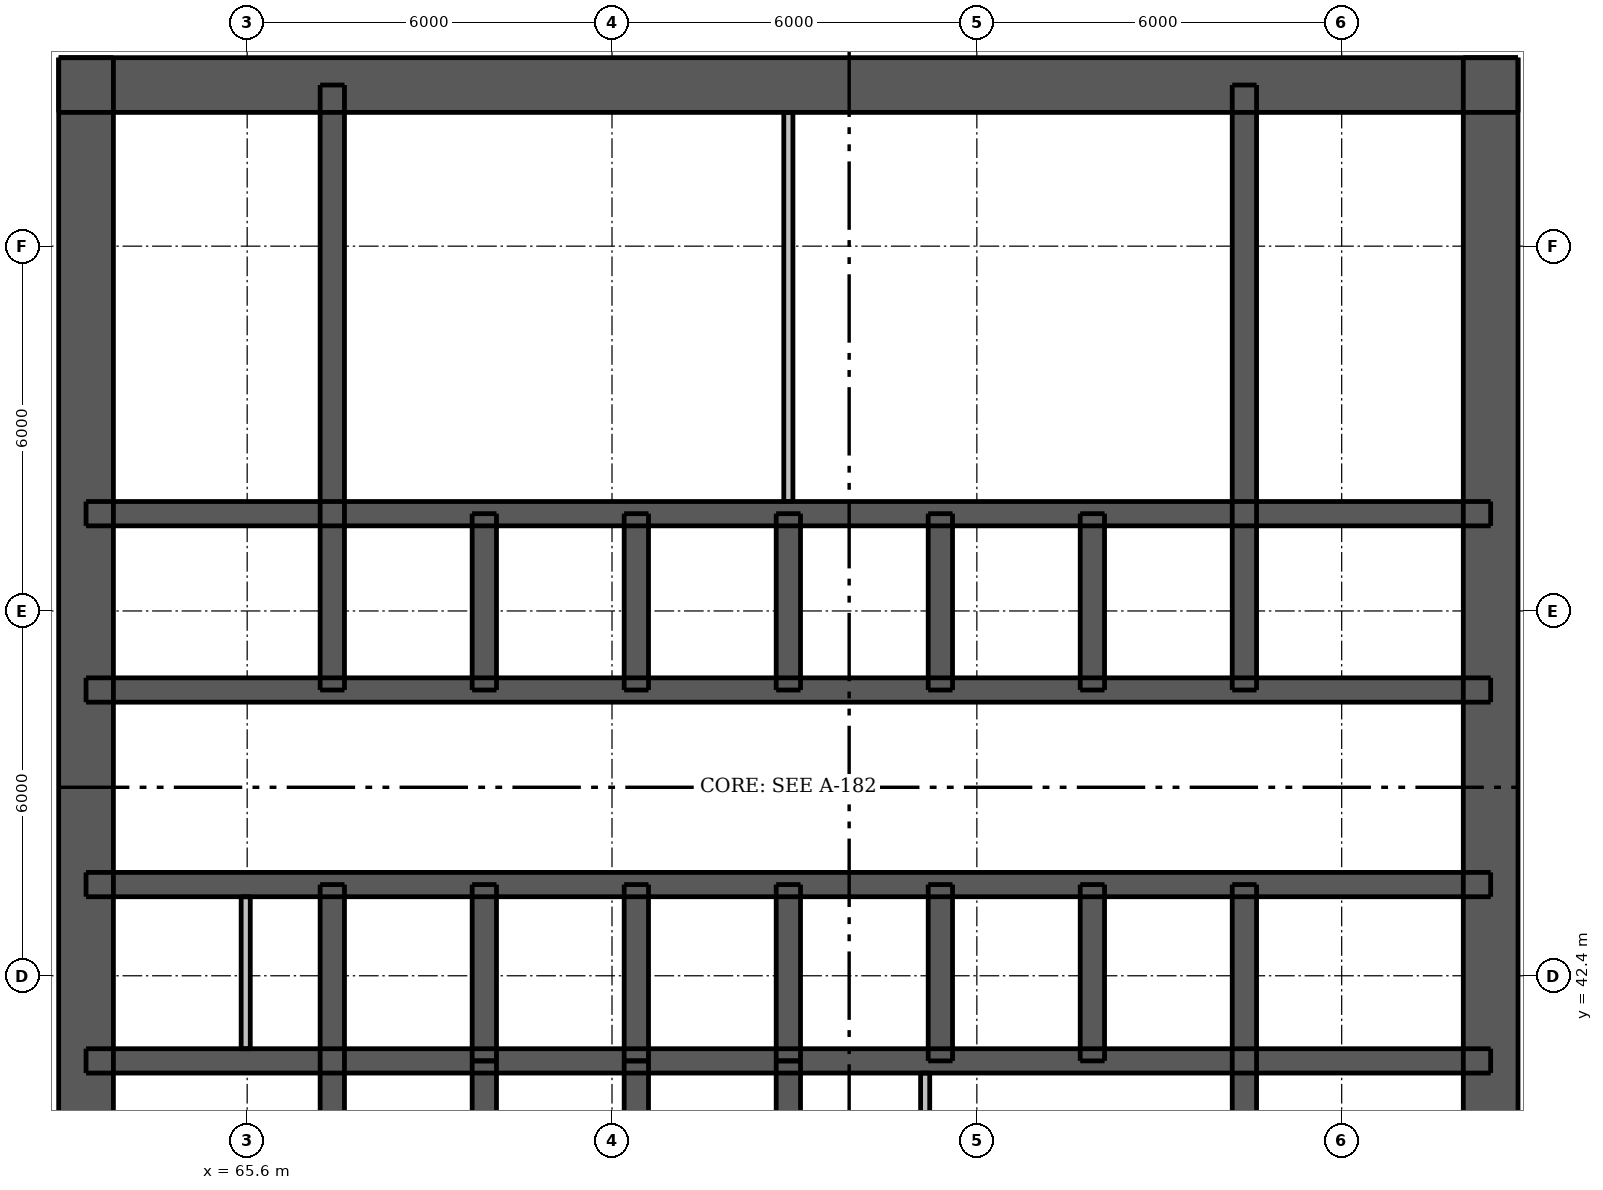
"""IFC4 building model, lengths in metres.
Left out: names, types, materials, properties, quantities, classifications, styles, units other than length and angle.
Written with IfcOpenShell. Run it as: python <this file> out.ifc"""

import sys

from ifc_helpers import new_model, si_unit, direction, frame, frame_2d, origin, place, context, subcontext, project, spatial, rectangle, extrude, element, fill, save


model = new_model("IFC4")
c1 = context("Model", 3, precision=1e-05, world=origin(), true_north=direction((0.0, 1.0)))
c2 = subcontext(c1, "Body", "Model", "MODEL_VIEW")
j1 = project(units=[si_unit("LENGTHUNIT", "METRE"), si_unit("PLANEANGLEUNIT", "RADIAN")], contexts=[c1])
p1 = place(None, origin())
s1 = spatial("IfcSite", under=j1, at=p1, CompositionType="ELEMENT")
p2 = place(p1, origin())
s2 = spatial("IfcBuilding", under=s1, at=p2, CompositionType="ELEMENT")
p3 = place(p2, frame((0.0, 0.0, 10.0)))
s3 = spatial("IfcBuildingStorey", under=s2, at=p3, CompositionType="ELEMENT", Elevation=10.0)
p4 = place(p3, frame((62.5, 57.05, 0.0), z_axis=(0.0, 0.0, 1.0), x_axis=(1.0, 0.0, 0.0)))
e1 = element("IfcWall", 1, at=p4, inside=s3, PredefinedType="SHEAR", context=c2, shape_type="SweptSolid", body=[
    extrude(rectangle(XDim=24.0, YDim=0.9, at=frame_2d((12.0, 0.0))), origin(), (0.0, 0.0, 1.0), 4.2),
])
p5 = place(p4, frame((20.85, 0.0, 0.0)))
e2 = element("IfcOpeningElement", 2, at=p5, cuts=e1, PredefinedType="OPENING", context=c2, shape_type="SweptSolid", body=[
    extrude(rectangle(XDim=1.1, YDim=2.1, at=frame_2d((0.55, 1.05))), frame((0.0, 0.46, 0.0), z_axis=(0.0, -1.0, 0.0), x_axis=(1.0, 0.0, 0.0)), (0.0, 0.0, 1.0), 0.92),
])
p6 = place(p4, frame((2.05, 0.0, 0.0)))
e3 = element("IfcOpeningElement", 3, at=p6, cuts=e1, PredefinedType="OPENING", context=c2, shape_type="SweptSolid", body=[
    extrude(rectangle(XDim=1.1, YDim=2.1, at=frame_2d((0.55, 1.05))), frame((0.0, 0.46, 0.0), z_axis=(0.0, -1.0, 0.0), x_axis=(1.0, 0.0, 0.0)), (0.0, 0.0, 1.0), 0.92),
])
p7 = place(p4, frame((7.9, 0.0, 0.0)))
e4 = element("IfcOpeningElement", 4, at=p7, cuts=e1, PredefinedType="OPENING", context=c2, shape_type="SweptSolid", body=[
    extrude(rectangle(XDim=0.9, YDim=2.1, at=frame_2d((0.45, 1.05))), frame((0.0, 0.46, 0.0), z_axis=(0.0, -1.0, 0.0), x_axis=(1.0, 0.0, 0.0)), (0.0, 0.0, 1.0), 0.92),
])
p8 = place(p4, frame((15.2, 0.0, 0.0)))
e5 = element("IfcOpeningElement", 5, at=p8, cuts=e1, PredefinedType="OPENING", context=c2, shape_type="SweptSolid", body=[
    extrude(rectangle(XDim=0.9, YDim=2.1, at=frame_2d((0.45, 1.05))), frame((0.0, 0.46, 0.0), z_axis=(0.0, -1.0, 0.0), x_axis=(1.0, 0.0, 0.0)), (0.0, 0.0, 1.0), 0.92),
])
p9 = place(p3, frame((62.95, 33.5, 0.0), z_axis=(0.0, 0.0, 1.0), x_axis=(0.0, 1.0, 0.0)))
e6 = element("IfcWall", 6, at=p9, inside=s3, PredefinedType="SHEAR", context=c2, shape_type="SweptSolid", body=[
    extrude(rectangle(XDim=24.0, YDim=0.9, at=frame_2d((12.0, 0.0))), origin(), (0.0, 0.0, 1.0), 4.2),
])
p10 = place(p9, frame((11.2, 0.0, 0.0)))
e7 = element("IfcOpeningElement", 7, at=p10, cuts=e6, PredefinedType="OPENING", context=c2, shape_type="SweptSolid", body=[
    extrude(rectangle(XDim=1.6, YDim=2.1, at=frame_2d((0.8, 1.05))), frame((0.0, 0.46, 0.0), z_axis=(0.0, -1.0, 0.0), x_axis=(1.0, 0.0, 0.0)), (0.0, 0.0, 1.0), 0.92),
])
p11 = place(p3, frame((86.05, 33.5, 0.0), z_axis=(0.0, 0.0, 1.0), x_axis=(0.0, 1.0, 0.0)))
e8 = element("IfcWall", 8, at=p11, inside=s3, PredefinedType="SHEAR", context=c2, shape_type="SweptSolid", body=[
    extrude(rectangle(XDim=24.0, YDim=0.9, at=frame_2d((12.0, 0.0))), origin(), (0.0, 0.0, 1.0), 4.2),
])
p12 = place(p11, frame((11.2, 0.0, 0.0)))
e9 = element("IfcOpeningElement", 9, at=p12, cuts=e8, PredefinedType="OPENING", context=c2, shape_type="SweptSolid", body=[
    extrude(rectangle(XDim=1.6, YDim=2.1, at=frame_2d((0.8, 1.05))), frame((0.0, 0.46, 0.0), z_axis=(0.0, -1.0, 0.0), x_axis=(1.0, 0.0, 0.0)), (0.0, 0.0, 1.0), 0.92),
])
p13 = place(p3, frame((62.95, 41.0, 0.0), z_axis=(0.0, 0.0, 1.0), x_axis=(1.0, 0.0, 0.0)))
e10 = element("IfcWall", 10, at=p13, inside=s3, PredefinedType="SHEAR", context=c2, shape_type="SweptSolid", body=[
    extrude(rectangle(XDim=23.1, YDim=0.4, at=frame_2d((11.55, 0.0))), origin(), (0.0, 0.0, 1.0), 4.2),
])
p14 = place(p3, frame((62.95, 43.9, 0.0), z_axis=(0.0, 0.0, 1.0), x_axis=(1.0, 0.0, 0.0)))
e11 = element("IfcWall", 11, at=p14, inside=s3, PredefinedType="SHEAR", context=c2, shape_type="SweptSolid", body=[
    extrude(rectangle(XDim=23.1, YDim=0.4, at=frame_2d((11.55, 0.0))), origin(), (0.0, 0.0, 1.0), 4.2),
])
p15 = place(p14, frame((1.088, 0.0, 0.0)))
e12 = element("IfcOpeningElement", 12, at=p15, cuts=e11, PredefinedType="OPENING", context=c2, shape_type="SweptSolid", body=[
    extrude(rectangle(XDim=0.9, YDim=2.1, at=frame_2d((0.45, 1.05))), frame((0.0, 0.21, 0.0), z_axis=(0.0, -1.0, 0.0), x_axis=(1.0, 0.0, 0.0)), (0.0, 0.0, 1.0), 0.42),
])
p16 = place(p14, frame((2.838, 0.0, 0.0)))
e13 = element("IfcOpeningElement", 13, at=p16, cuts=e11, PredefinedType="OPENING", context=c2, shape_type="SweptSolid", body=[
    extrude(rectangle(XDim=0.8, YDim=2.1, at=frame_2d((0.4, 1.05))), frame((0.0, 0.21, 0.0), z_axis=(0.0, -1.0, 0.0), x_axis=(1.0, 0.0, 0.0)), (0.0, 0.0, 1.0), 0.42),
])
p17 = place(p14, frame((20.5, 0.0, 0.0)))
e14 = element("IfcOpeningElement", 14, at=p17, cuts=e11, PredefinedType="OPENING", context=c2, shape_type="SweptSolid", body=[
    extrude(rectangle(XDim=0.9, YDim=2.1, at=frame_2d((0.45, 1.05))), frame((0.0, 0.21, 0.0), z_axis=(0.0, -1.0, 0.0), x_axis=(1.0, 0.0, 0.0)), (0.0, 0.0, 1.0), 0.42),
])
p18 = place(p14, frame((4.75, 0.0, 0.0)))
e15 = element("IfcOpeningElement", 15, at=p18, cuts=e11, PredefinedType="OPENING", context=c2, shape_type="SweptSolid", body=[
    extrude(rectangle(XDim=1.1, YDim=2.1, at=frame_2d((0.55, 1.05))), frame((0.0, 0.21, 0.0), z_axis=(0.0, -1.0, 0.0), x_axis=(1.0, 0.0, 0.0)), (0.0, 0.0, 1.0), 0.42),
])
p19 = place(p14, frame((7.25, 0.0, 0.0)))
e16 = element("IfcOpeningElement", 16, at=p19, cuts=e11, PredefinedType="OPENING", context=c2, shape_type="SweptSolid", body=[
    extrude(rectangle(XDim=1.1, YDim=2.1, at=frame_2d((0.55, 1.05))), frame((0.0, 0.21, 0.0), z_axis=(0.0, -1.0, 0.0), x_axis=(1.0, 0.0, 0.0)), (0.0, 0.0, 1.0), 0.42),
])
p20 = place(p14, frame((9.75, 0.0, 0.0)))
e17 = element("IfcOpeningElement", 17, at=p20, cuts=e11, PredefinedType="OPENING", context=c2, shape_type="SweptSolid", body=[
    extrude(rectangle(XDim=1.1, YDim=2.1, at=frame_2d((0.55, 1.05))), frame((0.0, 0.21, 0.0), z_axis=(0.0, -1.0, 0.0), x_axis=(1.0, 0.0, 0.0)), (0.0, 0.0, 1.0), 0.42),
])
p21 = place(p14, frame((12.25, 0.0, 0.0)))
e18 = element("IfcOpeningElement", 18, at=p21, cuts=e11, PredefinedType="OPENING", context=c2, shape_type="SweptSolid", body=[
    extrude(rectangle(XDim=1.1, YDim=2.1, at=frame_2d((0.55, 1.05))), frame((0.0, 0.21, 0.0), z_axis=(0.0, -1.0, 0.0), x_axis=(1.0, 0.0, 0.0)), (0.0, 0.0, 1.0), 0.42),
])
p22 = place(p14, frame((14.75, 0.0, 0.0)))
e19 = element("IfcOpeningElement", 19, at=p22, cuts=e11, PredefinedType="OPENING", context=c2, shape_type="SweptSolid", body=[
    extrude(rectangle(XDim=1.1, YDim=2.1, at=frame_2d((0.55, 1.05))), frame((0.0, 0.21, 0.0), z_axis=(0.0, -1.0, 0.0), x_axis=(1.0, 0.0, 0.0)), (0.0, 0.0, 1.0), 0.42),
])
p23 = place(p14, frame((17.25, 0.0, 0.0)))
e20 = element("IfcOpeningElement", 20, at=p23, cuts=e11, PredefinedType="OPENING", context=c2, shape_type="SweptSolid", body=[
    extrude(rectangle(XDim=1.1, YDim=2.1, at=frame_2d((0.55, 1.05))), frame((0.0, 0.21, 0.0), z_axis=(0.0, -1.0, 0.0), x_axis=(1.0, 0.0, 0.0)), (0.0, 0.0, 1.0), 0.42),
])
p24 = place(p3, frame((62.95, 47.1, 0.0), z_axis=(0.0, 0.0, 1.0), x_axis=(1.0, 0.0, 0.0)))
e21 = element("IfcWall", 21, at=p24, inside=s3, PredefinedType="SHEAR", context=c2, shape_type="SweptSolid", body=[
    extrude(rectangle(XDim=23.1, YDim=0.4, at=frame_2d((11.55, 0.0))), origin(), (0.0, 0.0, 1.0), 4.2),
])
p25 = place(p24, frame((1.7, 0.0, 0.0)))
e22 = element("IfcOpeningElement", 22, at=p25, cuts=e21, PredefinedType="OPENING", context=c2, shape_type="SweptSolid", body=[
    extrude(rectangle(XDim=0.9, YDim=2.1, at=frame_2d((0.45, 1.05))), frame((0.0, 0.21, 0.0), z_axis=(0.0, -1.0, 0.0), x_axis=(1.0, 0.0, 0.0)), (0.0, 0.0, 1.0), 0.42),
])
p26 = place(p24, frame((20.5, 0.0, 0.0)))
e23 = element("IfcOpeningElement", 23, at=p26, cuts=e21, PredefinedType="OPENING", context=c2, shape_type="SweptSolid", body=[
    extrude(rectangle(XDim=0.9, YDim=2.1, at=frame_2d((0.45, 1.05))), frame((0.0, 0.21, 0.0), z_axis=(0.0, -1.0, 0.0), x_axis=(1.0, 0.0, 0.0)), (0.0, 0.0, 1.0), 0.42),
])
p27 = place(p3, frame((62.95, 50.0, 0.0), z_axis=(0.0, 0.0, 1.0), x_axis=(1.0, 0.0, 0.0)))
e24 = element("IfcWall", 24, at=p27, inside=s3, PredefinedType="SHEAR", context=c2, shape_type="SweptSolid", body=[
    extrude(rectangle(XDim=23.1, YDim=0.4, at=frame_2d((11.55, 0.0))), origin(), (0.0, 0.0, 1.0), 4.2),
])
p28 = place(p3, frame((67.0, 33.95, 0.0), z_axis=(0.0, 0.0, 1.0), x_axis=(0.0, 1.0, 0.0)))
e25 = element("IfcWall", 25, at=p28, inside=s3, PredefinedType="SHEAR", context=c2, shape_type="SweptSolid", body=[
    extrude(rectangle(XDim=9.95, YDim=0.4, at=frame_2d((4.975, 0.0))), origin(), (0.0, 0.0, 1.0), 4.2),
])
p29 = place(p28, frame((0.65, 0.0, 0.0)))
e26 = element("IfcOpeningElement", 26, at=p29, cuts=e25, PredefinedType="OPENING", context=c2, shape_type="SweptSolid", body=[
    extrude(rectangle(XDim=1.1, YDim=2.1, at=frame_2d((0.55, 1.05))), frame((0.0, 0.21, 0.0), z_axis=(0.0, -1.0, 0.0), x_axis=(1.0, 0.0, 0.0)), (0.0, 0.0, 1.0), 0.42),
])
for number, where, z_axis, x_axis in (
    (27, (67.0, 47.1, 0.0), (0.0, 0.0, 1.0), (0.0, 1.0, 0.0)),
    (28, (82.0, 33.95, 0.0), (0.0, 0.0, 1.0), (0.0, 1.0, 0.0)),
    (29, (82.0, 47.1, 0.0), (0.0, 0.0, 1.0), (0.0, 1.0, 0.0)),
):
    element("IfcWall", number, at=place(p3, frame(where, z_axis=z_axis, x_axis=x_axis)), inside=s3, PredefinedType="SHEAR", context=c2, shape_type="SweptSolid", body=[
        extrude(rectangle(XDim=9.95, YDim=0.4, at=frame_2d((4.975, 0.0))), origin(), (0.0, 0.0, 1.0), 4.2),
    ])
for number, where, z_axis, x_axis in (
    (30, (69.5, 41.0, 0.0), (0.0, 0.0, 1.0), (0.0, 1.0, 0.0)),
    (31, (69.5, 47.1, 0.0), (0.0, 0.0, 1.0), (0.0, 1.0, 0.0)),
    (32, (72.0, 41.0, 0.0), (0.0, 0.0, 1.0), (0.0, 1.0, 0.0)),
    (33, (72.0, 47.1, 0.0), (0.0, 0.0, 1.0), (0.0, 1.0, 0.0)),
    (34, (74.5, 41.0, 0.0), (0.0, 0.0, 1.0), (0.0, 1.0, 0.0)),
    (35, (74.5, 47.1, 0.0), (0.0, 0.0, 1.0), (0.0, 1.0, 0.0)),
    (36, (77.0, 41.0, 0.0), (0.0, 0.0, 1.0), (0.0, 1.0, 0.0)),
    (37, (77.0, 47.1, 0.0), (0.0, 0.0, 1.0), (0.0, 1.0, 0.0)),
    (38, (79.5, 41.0, 0.0), (0.0, 0.0, 1.0), (0.0, 1.0, 0.0)),
    (39, (79.5, 47.1, 0.0), (0.0, 0.0, 1.0), (0.0, 1.0, 0.0)),
    (40, (69.5, 38.1, 0.0), (0.0, 0.0, 1.0), (0.0, 1.0, 0.0)),
    (41, (72.0, 38.1, 0.0), (0.0, 0.0, 1.0), (0.0, 1.0, 0.0)),
    (42, (74.5, 38.1, 0.0), (0.0, 0.0, 1.0), (0.0, 1.0, 0.0)),
):
    element("IfcWall", number, at=place(p3, frame(where, z_axis=z_axis, x_axis=x_axis)), inside=s3, PredefinedType="SHEAR", context=c2, shape_type="SweptSolid", body=[
        extrude(rectangle(XDim=2.9, YDim=0.4, at=frame_2d((1.45, 0.0))), origin(), (0.0, 0.0, 1.0), 4.2),
    ])
p30 = place(p3, frame((76.75, 34.4, 0.0), z_axis=(0.0, 0.0, 1.0), x_axis=(0.0, 1.0, 0.0)))
e43 = element("IfcWall", 43, at=p30, inside=s3, PredefinedType="PLUMBINGWALL", context=c2, shape_type="SweptSolid", body=[
    extrude(rectangle(XDim=6.4, YDim=0.15, at=frame_2d((3.2, 0.0))), origin(), (0.0, 0.0, 1.0), 4.2),
])
p31 = place(p3, frame((65.576, 41.2, 0.0), z_axis=(0.0, 0.0, 1.0), x_axis=(0.0, 1.0, 0.0)))
e44 = element("IfcWall", 44, at=p31, inside=s3, PredefinedType="PLUMBINGWALL", context=c2, shape_type="SweptSolid", body=[
    extrude(rectangle(XDim=2.5, YDim=0.15, at=frame_2d((1.25, 0.0))), origin(), (0.0, 0.0, 1.0), 4.2),
])
p32 = place(p3, frame((74.5, 50.2, 0.0), z_axis=(0.0, 0.0, 1.0), x_axis=(0.0, 1.0, 0.0)))
e45 = element("IfcWall", 45, at=p32, inside=s3, PredefinedType="PLUMBINGWALL", context=c2, shape_type="SweptSolid", body=[
    extrude(rectangle(XDim=6.4, YDim=0.15, at=frame_2d((3.2, 0.0))), origin(), (0.0, 0.0, 1.0), 4.2),
])
p33 = place(p5, origin())
e46 = element("IfcDoor", 46, at=p33, inside=s3, OperationType="SINGLE_SWING_RIGHT", PredefinedType="DOOR", context=c2, shape_type="SweptSolid", body=[
    extrude(rectangle(XDim=1.1, YDim=2.1, at=frame_2d((0.55, 1.05))), frame((0.0, -0.388, 0.0), z_axis=(0.0, -1.0, 0.0), x_axis=(1.0, 0.0, 0.0)), (0.0, 0.0, 1.0), 0.05),
])
fill(e2, e46)
p34 = place(p6, origin())
e47 = element("IfcDoor", 47, at=p34, inside=s3, OperationType="SINGLE_SWING_LEFT", PredefinedType="DOOR", context=c2, shape_type="SweptSolid", body=[
    extrude(rectangle(XDim=1.1, YDim=2.1, at=frame_2d((0.55, 1.05))), frame((0.0, -0.388, 0.0), z_axis=(0.0, -1.0, 0.0), x_axis=(1.0, 0.0, 0.0)), (0.0, 0.0, 1.0), 0.05),
])
fill(e3, e47)
p35 = place(p10, origin())
e48 = element("IfcDoor", 48, at=p35, inside=s3, OperationType="DOUBLE_DOOR_SINGLE_SWING", PredefinedType="DOOR", context=c2, shape_type="SweptSolid", body=[
    extrude(rectangle(XDim=1.6, YDim=2.1, at=frame_2d((0.8, 1.05))), frame((0.0, -0.388, 0.0), z_axis=(0.0, -1.0, 0.0), x_axis=(1.0, 0.0, 0.0)), (0.0, 0.0, 1.0), 0.05),
])
fill(e7, e48)
p36 = place(p12, origin())
e49 = element("IfcDoor", 49, at=p36, inside=s3, OperationType="DOUBLE_DOOR_SINGLE_SWING", PredefinedType="DOOR", context=c2, shape_type="SweptSolid", body=[
    extrude(rectangle(XDim=1.6, YDim=2.1, at=frame_2d((0.8, 1.05))), frame((0.0, 0.438, 0.0), z_axis=(0.0, -1.0, 0.0), x_axis=(1.0, 0.0, 0.0)), (0.0, 0.0, 1.0), 0.05),
])
fill(e9, e49)
p37 = place(p15, origin())
e50 = element("IfcDoor", 50, at=p37, inside=s3, OperationType="SINGLE_SWING_LEFT", PredefinedType="DOOR", context=c2, shape_type="SweptSolid", body=[
    extrude(rectangle(XDim=0.9, YDim=2.1, at=frame_2d((0.45, 1.05))), frame((0.0, -0.138, 0.0), z_axis=(0.0, -1.0, 0.0), x_axis=(1.0, 0.0, 0.0)), (0.0, 0.0, 1.0), 0.05),
])
fill(e12, e50)
p38 = place(p16, origin())
e51 = element("IfcDoor", 51, at=p38, inside=s3, OperationType="SINGLE_SWING_RIGHT", PredefinedType="DOOR", context=c2, shape_type="SweptSolid", body=[
    extrude(rectangle(XDim=0.8, YDim=2.1, at=frame_2d((0.4, 1.05))), frame((0.0, -0.138, 0.0), z_axis=(0.0, -1.0, 0.0), x_axis=(1.0, 0.0, 0.0)), (0.0, 0.0, 1.0), 0.05),
])
fill(e13, e51)
p39 = place(p17, origin())
e52 = element("IfcDoor", 52, at=p39, inside=s3, OperationType="SINGLE_SWING_LEFT", PredefinedType="DOOR", context=c2, shape_type="SweptSolid", body=[
    extrude(rectangle(XDim=0.9, YDim=2.1, at=frame_2d((0.45, 1.05))), frame((0.0, -0.138, 0.0), z_axis=(0.0, -1.0, 0.0), x_axis=(1.0, 0.0, 0.0)), (0.0, 0.0, 1.0), 0.05),
])
fill(e14, e52)
p40 = place(p25, origin())
e53 = element("IfcDoor", 53, at=p40, inside=s3, OperationType="SINGLE_SWING_LEFT", PredefinedType="DOOR", context=c2, shape_type="SweptSolid", body=[
    extrude(rectangle(XDim=0.9, YDim=2.1, at=frame_2d((0.45, 1.05))), frame((0.0, 0.188, 0.0), z_axis=(0.0, -1.0, 0.0), x_axis=(1.0, 0.0, 0.0)), (0.0, 0.0, 1.0), 0.05),
])
fill(e22, e53)
p41 = place(p26, origin())
e54 = element("IfcDoor", 54, at=p41, inside=s3, OperationType="SINGLE_SWING_LEFT", PredefinedType="DOOR", context=c2, shape_type="SweptSolid", body=[
    extrude(rectangle(XDim=0.9, YDim=2.1, at=frame_2d((0.45, 1.05))), frame((0.0, 0.188, 0.0), z_axis=(0.0, -1.0, 0.0), x_axis=(1.0, 0.0, 0.0)), (0.0, 0.0, 1.0), 0.05),
])
fill(e23, e54)
p42 = place(p7, origin())
e55 = element("IfcDoor", 55, at=p42, inside=s3, OperationType="SINGLE_SWING_RIGHT", PredefinedType="DOOR", context=c2, shape_type="SweptSolid", body=[
    extrude(rectangle(XDim=0.9, YDim=2.1, at=frame_2d((0.45, 1.05))), frame((0.0, -0.388, 0.0), z_axis=(0.0, -1.0, 0.0), x_axis=(1.0, 0.0, 0.0)), (0.0, 0.0, 1.0), 0.05),
])
fill(e4, e55)
p43 = place(p8, origin())
e56 = element("IfcDoor", 56, at=p43, inside=s3, OperationType="SINGLE_SWING_RIGHT", PredefinedType="DOOR", context=c2, shape_type="SweptSolid", body=[
    extrude(rectangle(XDim=0.9, YDim=2.1, at=frame_2d((0.45, 1.05))), frame((0.0, -0.388, 0.0), z_axis=(0.0, -1.0, 0.0), x_axis=(1.0, 0.0, 0.0)), (0.0, 0.0, 1.0), 0.05),
])
fill(e5, e56)
p44 = place(p18, origin())
e57 = element("IfcDoor", 57, at=p44, inside=s3, OperationType="DOUBLE_DOOR_SLIDING", PredefinedType="DOOR", context=c2, shape_type="SweptSolid", body=[
    extrude(rectangle(XDim=1.1, YDim=2.1, at=frame_2d((0.55, 1.05))), frame((0.0, 0.025, 0.0), z_axis=(0.0, -1.0, 0.0), x_axis=(1.0, 0.0, 0.0)), (0.0, 0.0, 1.0), 0.05),
])
fill(e15, e57)
p45 = place(p19, origin())
e58 = element("IfcDoor", 58, at=p45, inside=s3, OperationType="DOUBLE_DOOR_SLIDING", PredefinedType="DOOR", context=c2, shape_type="SweptSolid", body=[
    extrude(rectangle(XDim=1.1, YDim=2.1, at=frame_2d((0.55, 1.05))), frame((0.0, 0.025, 0.0), z_axis=(0.0, -1.0, 0.0), x_axis=(1.0, 0.0, 0.0)), (0.0, 0.0, 1.0), 0.05),
])
fill(e16, e58)
p46 = place(p20, origin())
e59 = element("IfcDoor", 59, at=p46, inside=s3, OperationType="DOUBLE_DOOR_SLIDING", PredefinedType="DOOR", context=c2, shape_type="SweptSolid", body=[
    extrude(rectangle(XDim=1.1, YDim=2.1, at=frame_2d((0.55, 1.05))), frame((0.0, 0.025, 0.0), z_axis=(0.0, -1.0, 0.0), x_axis=(1.0, 0.0, 0.0)), (0.0, 0.0, 1.0), 0.05),
])
fill(e17, e59)
p47 = place(p21, origin())
e60 = element("IfcDoor", 60, at=p47, inside=s3, OperationType="DOUBLE_DOOR_SLIDING", PredefinedType="DOOR", context=c2, shape_type="SweptSolid", body=[
    extrude(rectangle(XDim=1.1, YDim=2.1, at=frame_2d((0.55, 1.05))), frame((0.0, 0.025, 0.0), z_axis=(0.0, -1.0, 0.0), x_axis=(1.0, 0.0, 0.0)), (0.0, 0.0, 1.0), 0.05),
])
fill(e18, e60)
p48 = place(p22, origin())
e61 = element("IfcDoor", 61, at=p48, inside=s3, OperationType="DOUBLE_DOOR_SLIDING", PredefinedType="DOOR", context=c2, shape_type="SweptSolid", body=[
    extrude(rectangle(XDim=1.1, YDim=2.1, at=frame_2d((0.55, 1.05))), frame((0.0, 0.025, 0.0), z_axis=(0.0, -1.0, 0.0), x_axis=(1.0, 0.0, 0.0)), (0.0, 0.0, 1.0), 0.05),
])
fill(e19, e61)
p49 = place(p23, origin())
e62 = element("IfcDoor", 62, at=p49, inside=s3, OperationType="DOUBLE_DOOR_SLIDING", PredefinedType="DOOR", context=c2, shape_type="SweptSolid", body=[
    extrude(rectangle(XDim=1.1, YDim=2.1, at=frame_2d((0.55, 1.05))), frame((0.0, 0.025, 0.0), z_axis=(0.0, -1.0, 0.0), x_axis=(1.0, 0.0, 0.0)), (0.0, 0.0, 1.0), 0.05),
])
fill(e20, e62)
save(model, sys.argv[1])
